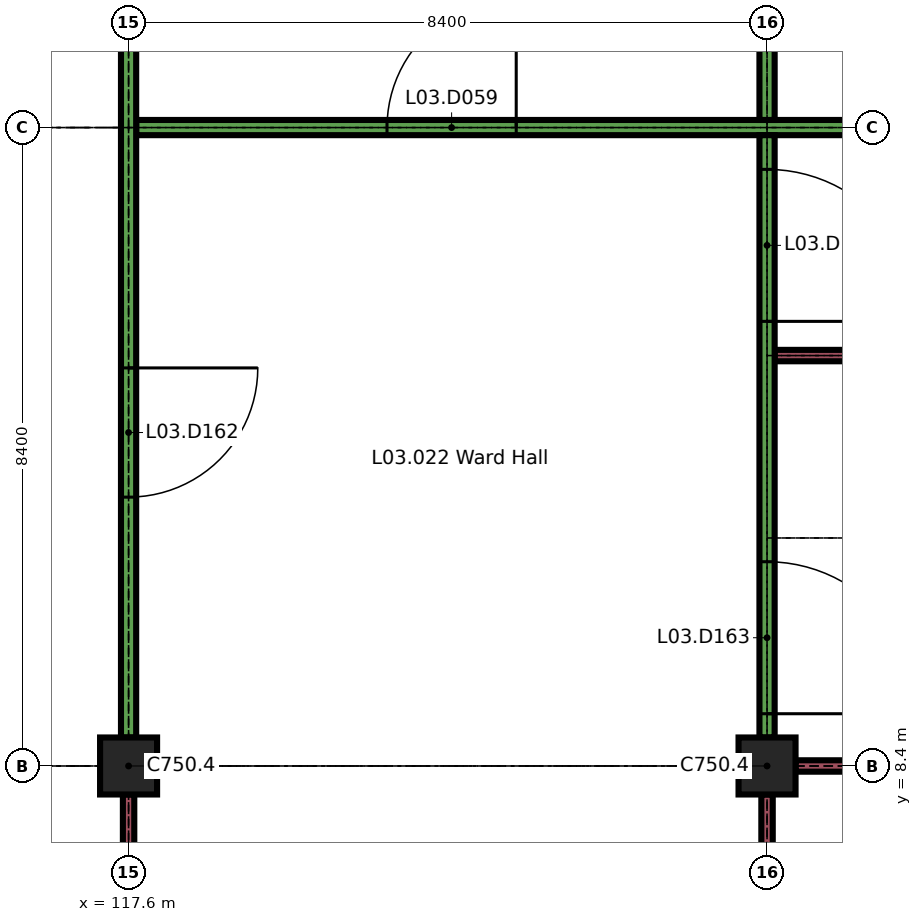
"""IFC4 building model, lengths in metres.
Left out: names, types, materials, properties, quantities, classifications, styles, units other than length and angle.
Written with IfcOpenShell. Run it as: python <this file> out.ifc"""

import sys

from ifc_helpers import new_model, si_unit, direction, frame, frame_2d, origin, origin_2d, place, context, subcontext, project, spatial, rectangle, extrude, element, fill, save


model = new_model("IFC4")
c1 = context("Model", 3, precision=1e-05, world=origin(), true_north=direction((0.0, 1.0)))
c2 = subcontext(c1, "Body", "Model", "MODEL_VIEW")
j1 = project(units=[si_unit("LENGTHUNIT", "METRE"), si_unit("PLANEANGLEUNIT", "RADIAN")], contexts=[c1])
p1 = place(None, origin())
s1 = spatial("IfcSite", under=j1, at=p1, CompositionType="ELEMENT")
p2 = place(p1, origin())
s2 = spatial("IfcBuilding", under=s1, at=p2, CompositionType="ELEMENT")
p3 = place(p2, frame((0.0, 0.0, 15.3)))
s3 = spatial("IfcBuildingStorey", under=s2, at=p3, CompositionType="ELEMENT", Elevation=15.3)
for number, where, z_axis, x_axis in (
    (1, (117.6, 8.4, 0.0), (0.0, 0.0, 1.0), (1.0, 0.0, 0.0)),
    (2, (126.0, 8.4, 0.0), (0.0, 0.0, 1.0), (1.0, 0.0, 0.0)),
):
    element("IfcColumn", number, at=place(p3, frame(where, z_axis=z_axis, x_axis=x_axis)), inside=s3, PredefinedType="COLUMN", context=c2, shape_type="SweptSolid", body=[
        extrude(rectangle(XDim=0.75, YDim=0.75, at=origin_2d()), origin(), (0.0, 0.0, 1.0), 3.26),
    ])
p4 = place(p3, frame((126.375, 8.4, 0.0), z_axis=(0.0, 0.0, 1.0), x_axis=(1.0, 0.0, 0.0)))
e3 = element("IfcWall", 3, at=p4, inside=s3, PredefinedType="PARTITIONING", context=c2, shape_type="SweptSolid", body=[
    extrude(rectangle(XDim=3.9, YDim=0.15, at=frame_2d((1.95, 0.0))), origin(), (0.0, 0.0, 1.0), 3.26),
])
p5 = place(p4, frame((2.325, 0.0, 0.0)))
e4 = element("IfcOpeningElement", 4, at=p5, cuts=e3, PredefinedType="OPENING", context=c2, shape_type="SweptSolid", body=[
    extrude(rectangle(XDim=1.2, YDim=2.1, at=frame_2d((0.6, 1.05))), frame((0.0, 0.085, 0.0), z_axis=(0.0, -1.0, 0.0), x_axis=(1.0, 0.0, 0.0)), (0.0, 0.0, 1.0), 0.17),
])
p6 = place(p3, frame((126.1, 13.8, 0.0), z_axis=(0.0, 0.0, 1.0), x_axis=(1.0, 0.0, 0.0)))
e5 = element("IfcWall", 5, at=p6, inside=s3, PredefinedType="PARTITIONING", context=c2, shape_type="SweptSolid", body=[
    extrude(rectangle(XDim=30.575, YDim=0.15, at=frame_2d((15.288, 0.0))), origin(), (0.0, 0.0, 1.0), 3.26),
])
p7 = place(p6, frame((9.8, 0.0, 0.0)))
e6 = element("IfcOpeningElement", 6, at=p7, cuts=e5, PredefinedType="OPENING", context=c2, shape_type="SweptSolid", body=[
    extrude(rectangle(XDim=1.2, YDim=2.1, at=frame_2d((0.6, 1.05))), frame((0.0, 0.085, 0.0), z_axis=(0.0, -1.0, 0.0), x_axis=(1.0, 0.0, 0.0)), (0.0, 0.0, 1.0), 0.17),
])
p8 = place(p6, frame((14.0, 0.0, 0.0)))
e7 = element("IfcOpeningElement", 7, at=p8, cuts=e5, PredefinedType="OPENING", context=c2, shape_type="SweptSolid", body=[
    extrude(rectangle(XDim=1.2, YDim=2.1, at=frame_2d((0.6, 1.05))), frame((0.0, 0.085, 0.0), z_axis=(0.0, -1.0, 0.0), x_axis=(1.0, 0.0, 0.0)), (0.0, 0.0, 1.0), 0.17),
])
p9 = place(p6, frame((21.85, 0.0, 0.0)))
e8 = element("IfcOpeningElement", 8, at=p9, cuts=e5, PredefinedType="OPENING", context=c2, shape_type="SweptSolid", body=[
    extrude(rectangle(XDim=0.9, YDim=2.1, at=frame_2d((0.45, 1.05))), frame((0.0, 0.085, 0.0), z_axis=(0.0, -1.0, 0.0), x_axis=(1.0, 0.0, 0.0)), (0.0, 0.0, 1.0), 0.17),
])
p10 = place(p3, frame((117.7, 16.8, 0.0), z_axis=(0.0, 0.0, 1.0), x_axis=(1.0, 0.0, 0.0)))
e9 = element("IfcWall", 9, at=p10, inside=s3, PredefinedType="PARTITIONING", context=c2, shape_type="SweptSolid", body=[
    extrude(rectangle(XDim=25.1, YDim=0.2, at=frame_2d((12.55, 0.0))), origin(), (0.0, 0.0, 1.0), 3.26),
])
p11 = place(p10, frame((3.3, 0.0, 0.0)))
e10 = element("IfcOpeningElement", 10, at=p11, cuts=e9, PredefinedType="OPENING", context=c2, shape_type="SweptSolid", body=[
    extrude(rectangle(XDim=1.7, YDim=2.4, at=frame_2d((0.85, 1.2))), frame((0.0, 0.11, 0.0), z_axis=(0.0, -1.0, 0.0), x_axis=(1.0, 0.0, 0.0)), (0.0, 0.0, 1.0), 0.22),
])
p12 = place(p10, frame((15.7, 0.0, 0.0)))
e11 = element("IfcOpeningElement", 11, at=p12, cuts=e9, PredefinedType="OPENING", context=c2, shape_type="SweptSolid", body=[
    extrude(rectangle(XDim=2.0, YDim=2.4, at=frame_2d((1.0, 1.2))), frame((0.0, 0.11, 0.0), z_axis=(0.0, -1.0, 0.0), x_axis=(1.0, 0.0, 0.0)), (0.0, 0.0, 1.0), 0.22),
])
p13 = place(p3, frame((117.6, 0.375, 0.0), z_axis=(0.0, 0.0, 1.0), x_axis=(0.0, 1.0, 0.0)))
e12 = element("IfcWall", 12, at=p13, inside=s3, PredefinedType="PARTITIONING", context=c2, shape_type="SweptSolid", body=[
    extrude(rectangle(XDim=7.65, YDim=0.15, at=frame_2d((3.825, 0.0))), origin(), (0.0, 0.0, 1.0), 3.26),
])
p14 = place(p3, frame((117.6, 8.775, 0.0), z_axis=(0.0, 0.0, 1.0), x_axis=(0.0, 1.0, 0.0)))
e13 = element("IfcWall", 13, at=p14, inside=s3, PredefinedType="PARTITIONING", context=c2, shape_type="SweptSolid", body=[
    extrude(rectangle(XDim=12.825, YDim=0.2, at=frame_2d((6.413, 0.0))), origin(), (0.0, 0.0, 1.0), 3.26),
])
p15 = place(p14, frame((3.163, 0.0, 0.0)))
e14 = element("IfcOpeningElement", 14, at=p15, cuts=e13, PredefinedType="OPENING", context=c2, shape_type="SweptSolid", body=[
    extrude(rectangle(XDim=1.7, YDim=2.4, at=frame_2d((0.85, 1.2))), frame((0.0, 0.11, 0.0), z_axis=(0.0, -1.0, 0.0), x_axis=(1.0, 0.0, 0.0)), (0.0, 0.0, 1.0), 0.22),
])
p16 = place(p3, frame((126.0, 0.375, 0.0), z_axis=(0.0, 0.0, 1.0), x_axis=(0.0, 1.0, 0.0)))
e15 = element("IfcWall", 15, at=p16, inside=s3, PredefinedType="PARTITIONING", context=c2, shape_type="SweptSolid", body=[
    extrude(rectangle(XDim=7.65, YDim=0.15, at=frame_2d((3.825, 0.0))), origin(), (0.0, 0.0, 1.0), 3.26),
])
p17 = place(p3, frame((126.0, 8.775, 0.0), z_axis=(0.0, 0.0, 1.0), x_axis=(0.0, 1.0, 0.0)))
e16 = element("IfcWall", 16, at=p17, inside=s3, PredefinedType="PARTITIONING", context=c2, shape_type="SweptSolid", body=[
    extrude(rectangle(XDim=7.925, YDim=0.2, at=frame_2d((3.962, 0.0))), origin(), (0.0, 0.0, 1.0), 3.26),
])
p18 = place(p17, frame((0.312, 0.0, 0.0)))
e17 = element("IfcOpeningElement", 17, at=p18, cuts=e16, PredefinedType="OPENING", context=c2, shape_type="SweptSolid", body=[
    extrude(rectangle(XDim=2.0, YDim=2.4, at=frame_2d((1.0, 1.2))), frame((0.0, 0.11, 0.0), z_axis=(0.0, -1.0, 0.0), x_axis=(1.0, 0.0, 0.0)), (0.0, 0.0, 1.0), 0.22),
])
p19 = place(p17, frame((5.475, 0.0, 0.0)))
e18 = element("IfcOpeningElement", 18, at=p19, cuts=e16, PredefinedType="OPENING", context=c2, shape_type="SweptSolid", body=[
    extrude(rectangle(XDim=2.0, YDim=2.4, at=frame_2d((1.0, 1.2))), frame((0.0, 0.11, 0.0), z_axis=(0.0, -1.0, 0.0), x_axis=(1.0, 0.0, 0.0)), (0.0, 0.0, 1.0), 0.22),
])
p20 = place(p3, frame((126.0, 16.9, 0.0), z_axis=(0.0, 0.0, 1.0), x_axis=(0.0, 1.0, 0.0)))
e19 = element("IfcWall", 19, at=p20, inside=s3, PredefinedType="PARTITIONING", context=c2, shape_type="SweptSolid", body=[
    extrude(rectangle(XDim=4.5, YDim=0.2, at=frame_2d((2.25, 0.0))), origin(), (0.0, 0.0, 1.0), 3.26),
])
p21 = place(p11, origin())
e20 = element("IfcDoor", 20, at=p21, inside=s3, OperationType="SINGLE_SWING_LEFT", PredefinedType="DOOR", context=c2, shape_type="SweptSolid", body=[
    extrude(rectangle(XDim=1.7, YDim=2.4, at=frame_2d((0.85, 1.2))), frame((0.0, 0.025, 0.0), z_axis=(0.0, -1.0, 0.0), x_axis=(1.0, 0.0, 0.0)), (0.0, 0.0, 1.0), 0.05),
])
fill(e10, e20)
p22 = place(p15, origin())
e21 = element("IfcDoor", 21, at=p22, inside=s3, OperationType="SINGLE_SWING_RIGHT", PredefinedType="DOOR", context=c2, shape_type="SweptSolid", body=[
    extrude(rectangle(XDim=1.7, YDim=2.4, at=frame_2d((0.85, 1.2))), frame((0.0, 0.025, 0.0), z_axis=(0.0, -1.0, 0.0), x_axis=(1.0, 0.0, 0.0)), (0.0, 0.0, 1.0), 0.05),
])
fill(e14, e21)
p23 = place(p18, origin())
e22 = element("IfcDoor", 22, at=p23, inside=s3, OperationType="SINGLE_SWING_LEFT", PredefinedType="DOOR", context=c2, shape_type="SweptSolid", body=[
    extrude(rectangle(XDim=2.0, YDim=2.4, at=frame_2d((1.0, 1.2))), frame((0.0, 0.03, 0.0), z_axis=(0.0, -1.0, 0.0), x_axis=(1.0, 0.0, 0.0)), (0.0, 0.0, 1.0), 0.06),
])
fill(e17, e22)
p24 = place(p19, origin())
e23 = element("IfcDoor", 23, at=p24, inside=s3, OperationType="SINGLE_SWING_LEFT", PredefinedType="DOOR", context=c2, shape_type="SweptSolid", body=[
    extrude(rectangle(XDim=2.0, YDim=2.4, at=frame_2d((1.0, 1.2))), frame((0.0, 0.03, 0.0), z_axis=(0.0, -1.0, 0.0), x_axis=(1.0, 0.0, 0.0)), (0.0, 0.0, 1.0), 0.06),
])
fill(e18, e23)
save(model, sys.argv[1])
